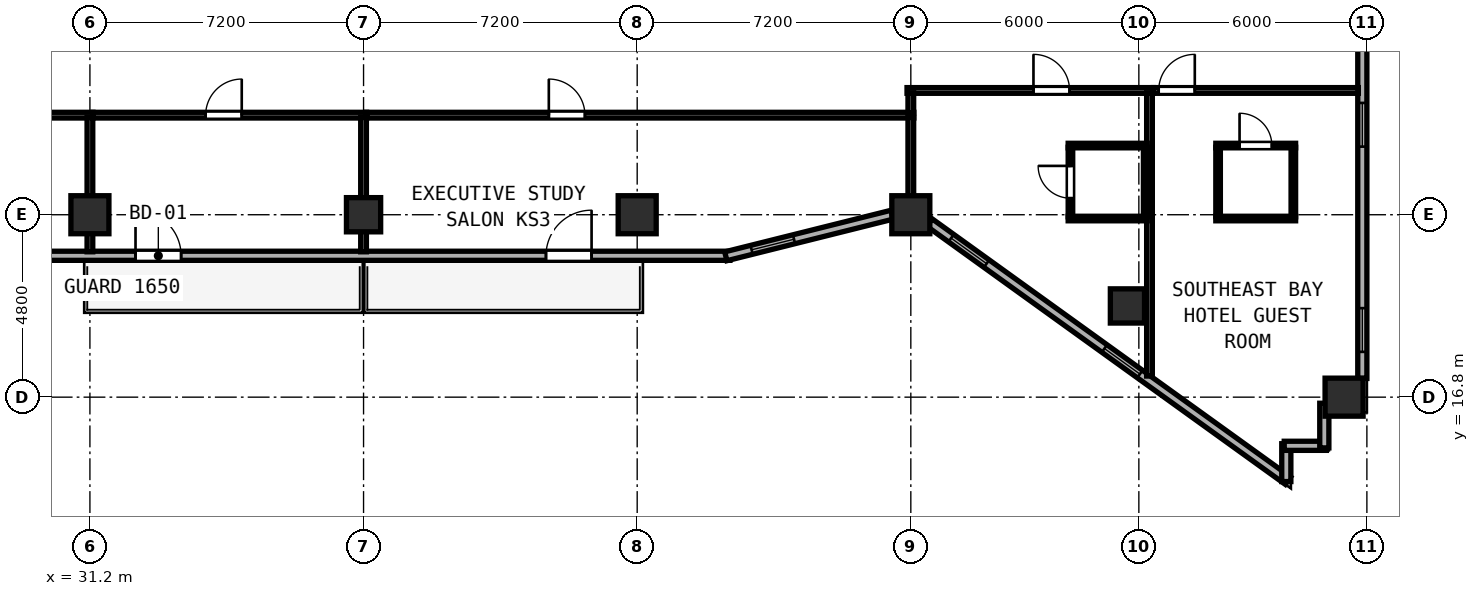
"""IFC4 building model, lengths in metres.
Left out: names, types, materials, properties, quantities, classifications, styles, units other than length and angle.
Written with IfcOpenShell. Run it as: python <this file> out.ifc"""

import sys

from ifc_helpers import new_model, si_unit, direction, frame, frame_2d, origin, origin_2d, place, context, subcontext, project, spatial, rectangle, hollow_rectangle, extrude, element, fill, save


model = new_model("IFC4")
c1 = context("Model", 3, precision=1e-05, world=origin(), true_north=direction((0.0, 1.0)))
c2 = subcontext(c1, "Body", "Model", "MODEL_VIEW")
j1 = project(units=[si_unit("LENGTHUNIT", "METRE"), si_unit("PLANEANGLEUNIT", "RADIAN")], contexts=[c1])
p1 = place(None, origin())
s1 = spatial("IfcSite", under=j1, at=p1, CompositionType="ELEMENT")
p2 = place(p1, origin())
s2 = spatial("IfcBuilding", under=s1, at=p2, CompositionType="ELEMENT")
p3 = place(p2, frame((0.0, 0.0, 144.8)))
s3 = spatial("IfcBuildingStorey", under=s2, at=p3, CompositionType="ELEMENT", Elevation=144.8)
for number, where, z_axis, x_axis in (
    (1, (52.8, 21.6, 0.0), (0.0, 0.0, 1.0), (1.0, 0.0, 0.0)),
    (2, (31.2, 21.6, 0.0), (0.0, 0.0, 1.0), (1.0, 0.0, 0.0)),
    (3, (45.6, 21.6, 0.0), (0.0, 0.0, 1.0), (1.0, 0.0, 0.0)),
    (4, (64.2, 16.8, 0.0), (0.0, 0.0, 1.0), (1.0, 0.0, 0.0)),
):
    element("IfcColumn", number, at=place(p3, frame(where, z_axis=z_axis, x_axis=x_axis)), inside=s3, PredefinedType="COLUMN", context=c2, shape_type="SweptSolid", body=[
        extrude(hollow_rectangle(XDim=1.0, YDim=1.0, WallThickness=0.038, at=origin_2d()), origin(), (0.0, 0.0, 1.0), 3.8),
    ])
for number, where, z_axis, x_axis in (
    (5, (38.4, 21.6, 0.0), (0.0, 0.0, 1.0), (1.0, 0.0, 0.0)),
    (6, (58.5, 19.2, 0.0), (0.0, 0.0, 1.0), (1.0, 0.0, 0.0)),
):
    element("IfcColumn", number, at=place(p3, frame(where, z_axis=z_axis, x_axis=x_axis)), inside=s3, PredefinedType="COLUMN", context=c2, shape_type="SweptSolid", body=[
        extrude(hollow_rectangle(XDim=0.9, YDim=0.9, WallThickness=0.034, at=origin_2d()), origin(), (0.0, 0.0, 1.0), 3.8),
    ])
p4 = place(p3, frame((28.76, 20.52, 0.0), z_axis=(0.0, 0.0, 1.0), x_axis=(1.0, 0.0, 0.0)))
e7 = element("IfcWall", 7, at=p4, inside=s3, PredefinedType="SOLIDWALL", context=c2, shape_type="SweptSolid", body=[
    extrude(rectangle(XDim=19.281, YDim=0.24, at=frame_2d((9.64, 0.0))), origin(), (0.0, 0.0, 1.0), 3.6),
])
p5 = place(p4, frame((4.84, 0.0, 0.0), z_axis=(0.0, 0.0, 1.0), x_axis=(-1.0, 0.0, 0.0)))
e8 = element("IfcOpeningElement", 8, at=p5, cuts=e7, PredefinedType="OPENING", context=c2, shape_type="SweptSolid", body=[
    extrude(rectangle(XDim=1.2, YDim=2.15, at=frame_2d((0.6, 1.075))), frame((0.0, 0.13, 0.0), z_axis=(0.0, -1.0, 0.0), x_axis=(1.0, 0.0, 0.0)), (0.0, 0.0, 1.0), 0.26),
])
p6 = place(p4, frame((15.64, 0.0, 0.0), z_axis=(0.0, 0.0, 1.0), x_axis=(-1.0, 0.0, 0.0)))
e9 = element("IfcOpeningElement", 9, at=p6, cuts=e7, PredefinedType="OPENING", context=c2, shape_type="SweptSolid", body=[
    extrude(rectangle(XDim=1.2, YDim=2.15, at=frame_2d((0.6, 1.075))), frame((0.0, 0.13, 0.0), z_axis=(0.0, -1.0, 0.0), x_axis=(1.0, 0.0, 0.0)), (0.0, 0.0, 1.0), 0.26),
])
p7 = place(p3, frame((47.932, 20.507, 0.0), z_axis=(0.0, 0.0, 1.0), x_axis=(0.970145683738, 0.242522890311, 0.0)))
e10 = element("IfcWall", 10, at=p7, inside=s3, PredefinedType="SOLIDWALL", context=c2, shape_type="SweptSolid", body=[
    extrude(rectangle(XDim=4.511, YDim=0.24, at=frame_2d((2.255, 0.0))), origin(), (0.0, 0.0, 1.0), 3.145),
])
p8 = place(p7, frame((0.7, 0.0, 0.85)))
e11 = element("IfcOpeningElement", 11, at=p8, cuts=e10, PredefinedType="OPENING", context=c2, shape_type="SweptSolid", body=[
    extrude(rectangle(XDim=1.15, YDim=1.8, at=frame_2d((0.575, 0.9))), frame((0.0, 0.13, 0.0), z_axis=(0.0, -1.0, 0.0), x_axis=(1.0, 0.0, 0.0)), (0.0, 0.0, 1.0), 0.26),
])
p9 = place(p3, frame((53.292, 21.394, 0.0), z_axis=(0.0, 0.0, 1.0), x_axis=(0.811543504691, -0.584291998913, 0.0)))
e12 = element("IfcWall", 12, at=p9, inside=s3, PredefinedType="SOLIDWALL", context=c2, shape_type="SweptSolid", body=[
    extrude(rectangle(XDim=11.623, YDim=0.24, at=frame_2d((5.812, 0.0))), origin(), (0.0, 0.0, 1.0), 3.145),
])
p10 = place(p9, frame((0.7, 0.0, 0.85)))
e13 = element("IfcOpeningElement", 13, at=p10, cuts=e12, PredefinedType="OPENING", context=c2, shape_type="SweptSolid", body=[
    extrude(rectangle(XDim=1.15, YDim=1.8, at=frame_2d((0.575, 0.9))), frame((0.0, 0.13, 0.0), z_axis=(0.0, -1.0, 0.0), x_axis=(1.0, 0.0, 0.0)), (0.0, 0.0, 1.0), 0.26),
])
p11 = place(p9, frame((5.671, 0.0, 0.85)))
e14 = element("IfcOpeningElement", 14, at=p11, cuts=e12, PredefinedType="OPENING", context=c2, shape_type="SweptSolid", body=[
    extrude(rectangle(XDim=1.15, YDim=1.8, at=frame_2d((0.575, 0.9))), frame((0.0, 0.13, 0.0), z_axis=(0.0, -1.0, 0.0), x_axis=(1.0, 0.0, 0.0)), (0.0, 0.0, 1.0), 0.26),
])
p12 = place(p3, frame((62.68, 14.579, 0.0), z_axis=(0.0, 0.0, 1.0), x_axis=(0.0, 1.0, 0.0)))
e15 = element("IfcWall", 15, at=p12, inside=s3, PredefinedType="SOLIDWALL", context=c2, shape_type="SweptSolid", body=[
    extrude(rectangle(XDim=0.996, YDim=0.24, at=frame_2d((0.498, 0.0))), origin(), (0.0, 0.0, 1.0), 3.6),
])
p13 = place(p3, frame((62.625, 15.52, 0.0), z_axis=(0.0, 0.0, 1.0), x_axis=(1.0, 0.0, 0.0)))
e16 = element("IfcWall", 16, at=p13, inside=s3, PredefinedType="SOLIDWALL", context=c2, shape_type="SweptSolid", body=[
    extrude(rectangle(XDim=1.11, YDim=0.24, at=frame_2d((0.555, 0.0))), origin(), (0.0, 0.0, 1.0), 3.6),
])
p14 = place(p3, frame((63.68, 15.465, 0.0), z_axis=(0.0, 0.0, 1.0), x_axis=(0.0, 1.0, 0.0)))
e17 = element("IfcWall", 17, at=p14, inside=s3, PredefinedType="SOLIDWALL", context=c2, shape_type="SweptSolid", body=[
    extrude(rectangle(XDim=1.175, YDim=0.24, at=frame_2d((0.587, 0.0))), origin(), (0.0, 0.0, 1.0), 3.6),
])
p15 = place(p3, frame((64.68, 17.292, 0.0), z_axis=(0.0, 0.0, 1.0), x_axis=(0.0, 1.0, 0.0)))
e18 = element("IfcWall", 18, at=p15, inside=s3, PredefinedType="SOLIDWALL", context=c2, shape_type="SweptSolid", body=[
    extrude(rectangle(XDim=9.816, YDim=0.24, at=frame_2d((4.908, 0.0))), origin(), (0.0, 0.0, 1.0), 3.6),
])
p16 = place(p15, frame((0.7, 0.0, 0.85)))
e19 = element("IfcOpeningElement", 19, at=p16, cuts=e18, PredefinedType="OPENING", context=c2, shape_type="SweptSolid", body=[
    extrude(rectangle(XDim=1.15, YDim=1.8, at=frame_2d((0.575, 0.9))), frame((0.0, 0.13, 0.0), z_axis=(0.0, -1.0, 0.0), x_axis=(1.0, 0.0, 0.0)), (0.0, 0.0, 1.0), 0.26),
])
p17 = place(p15, frame((6.1, 0.0, 0.85)))
e20 = element("IfcOpeningElement", 20, at=p17, cuts=e18, PredefinedType="OPENING", context=c2, shape_type="SweptSolid", body=[
    extrude(rectangle(XDim=1.15, YDim=1.8, at=frame_2d((0.575, 0.9))), frame((0.0, 0.13, 0.0), z_axis=(0.0, -1.0, 0.0), x_axis=(1.0, 0.0, 0.0)), (0.0, 0.0, 1.0), 0.26),
])
p18 = place(p3, frame((23.92, 24.22, 0.0), z_axis=(0.0, 0.0, 1.0), x_axis=(1.0, 0.0, 0.0)))
e21 = element("IfcWall", 21, at=p18, inside=s3, PredefinedType="PARTITIONING", context=c2, shape_type="SweptSolid", body=[
    extrude(rectangle(XDim=7.36, YDim=0.15, at=frame_2d((3.68, 0.0))), origin(), (0.0, 0.0, 1.0), 3.6),
])
p19 = place(p18, frame((5.845, 0.0, 0.0), z_axis=(0.0, 0.0, 1.0), x_axis=(-1.0, 0.0, 0.0)))
e22 = element("IfcOpeningElement", 22, at=p19, cuts=e21, PredefinedType="OPENING", context=c2, shape_type="SweptSolid", body=[
    extrude(rectangle(XDim=0.95, YDim=2.12, at=frame_2d((0.475, 1.06))), frame((0.0, 0.085, 0.0), z_axis=(0.0, -1.0, 0.0), x_axis=(1.0, 0.0, 0.0)), (0.0, 0.0, 1.0), 0.17),
])
p20 = place(p3, frame((31.2, 20.625, 0.0), z_axis=(0.0, 0.0, 1.0), x_axis=(0.0, 1.0, 0.0)))
e23 = element("IfcWall", 23, at=p20, inside=s3, PredefinedType="PARTITIONING", context=c2, shape_type="SweptSolid", body=[
    extrude(rectangle(XDim=3.535, YDim=0.15, at=frame_2d((1.768, 0.0))), origin(), (0.0, 0.0, 1.0), 3.085),
])
p21 = place(p3, frame((31.282, 24.22, 0.0), z_axis=(0.0, 0.0, 1.0), x_axis=(1.0, 0.0, 0.0)))
e24 = element("IfcWall", 24, at=p21, inside=s3, PredefinedType="PARTITIONING", context=c2, shape_type="SweptSolid", body=[
    extrude(rectangle(XDim=7.198, YDim=0.15, at=frame_2d((3.599, 0.0))), origin(), (0.0, 0.0, 1.0), 3.6),
])
p22 = place(p21, frame((3.913, 0.0, 0.0), z_axis=(0.0, 0.0, 1.0), x_axis=(-1.0, 0.0, 0.0)))
e25 = element("IfcOpeningElement", 25, at=p22, cuts=e24, PredefinedType="OPENING", context=c2, shape_type="SweptSolid", body=[
    extrude(rectangle(XDim=0.95, YDim=2.12, at=frame_2d((0.475, 1.06))), frame((0.0, 0.085, 0.0), z_axis=(0.0, -1.0, 0.0), x_axis=(1.0, 0.0, 0.0)), (0.0, 0.0, 1.0), 0.17),
])
p23 = place(p3, frame((38.4, 20.625, 0.0), z_axis=(0.0, 0.0, 1.0), x_axis=(0.0, 1.0, 0.0)))
e26 = element("IfcWall", 26, at=p23, inside=s3, PredefinedType="PARTITIONING", context=c2, shape_type="SweptSolid", body=[
    extrude(rectangle(XDim=3.535, YDim=0.15, at=frame_2d((1.768, 0.0))), origin(), (0.0, 0.0, 1.0), 3.085),
])
p24 = place(p3, frame((38.482, 24.22, 0.0), z_axis=(0.0, 0.0, 1.0), x_axis=(1.0, 0.0, 0.0)))
e27 = element("IfcWall", 27, at=p24, inside=s3, PredefinedType="PARTITIONING", context=c2, shape_type="SweptSolid", body=[
    extrude(rectangle(XDim=14.398, YDim=0.15, at=frame_2d((7.199, 0.0))), origin(), (0.0, 0.0, 1.0), 3.6),
])
p25 = place(p24, frame((5.743, 0.0, 0.0), z_axis=(0.0, 0.0, 1.0), x_axis=(-1.0, 0.0, 0.0)))
e28 = element("IfcOpeningElement", 28, at=p25, cuts=e27, PredefinedType="OPENING", context=c2, shape_type="SweptSolid", body=[
    extrude(rectangle(XDim=0.95, YDim=2.12, at=frame_2d((0.475, 1.06))), frame((0.0, 0.085, 0.0), z_axis=(0.0, -1.0, 0.0), x_axis=(1.0, 0.0, 0.0)), (0.0, 0.0, 1.0), 0.17),
])
p26 = place(p3, frame((52.8, 21.819, 0.0), z_axis=(0.0, 0.0, 1.0), x_axis=(0.0, 1.0, 0.0)))
e29 = element("IfcWall", 29, at=p26, inside=s3, PredefinedType="PARTITIONING", context=c2, shape_type="SweptSolid", body=[
    extrude(rectangle(XDim=2.341, YDim=0.15, at=frame_2d((1.171, 0.0))), origin(), (0.0, 0.0, 1.0), 3.145),
])
p27 = place(p3, frame((52.7, 24.87, 0.0), z_axis=(0.0, 0.0, 1.0), x_axis=(1.0, 0.0, 0.0)))
e30 = element("IfcWall", 30, at=p27, inside=s3, PredefinedType="PARTITIONING", context=c2, shape_type="SweptSolid", body=[
    extrude(rectangle(XDim=6.48, YDim=0.15, at=frame_2d((3.24, 0.0))), origin(), (0.0, 0.0, 1.0), 3.235),
])
p28 = place(p27, frame((4.277, 0.0, 0.0), z_axis=(0.0, 0.0, 1.0), x_axis=(-1.0, 0.0, 0.0)))
e31 = element("IfcOpeningElement", 31, at=p28, cuts=e30, PredefinedType="OPENING", context=c2, shape_type="SweptSolid", body=[
    extrude(rectangle(XDim=0.95, YDim=2.15, at=frame_2d((0.475, 1.075))), frame((0.0, 0.085, 0.0), z_axis=(0.0, -1.0, 0.0), x_axis=(1.0, 0.0, 0.0)), (0.0, 0.0, 1.0), 0.17),
])
p29 = place(p3, frame((52.8, 24.28, 0.0), z_axis=(0.0, 0.0, 1.0), x_axis=(0.0, 1.0, 0.0)))
e32 = element("IfcWall", 32, at=p29, inside=s3, PredefinedType="PARTITIONING", context=c2, shape_type="SweptSolid", body=[
    extrude(rectangle(XDim=0.53, YDim=0.15, at=frame_2d((0.265, 0.0))), origin(), (0.0, 0.0, 1.0), 3.145),
])
p30 = place(p3, frame((59.08, 17.356, 0.0), z_axis=(0.0, 0.0, 1.0), x_axis=(0.0, 1.0, 0.0)))
e33 = element("IfcWall", 33, at=p30, inside=s3, PredefinedType="PARTITIONING", context=c2, shape_type="SweptSolid", body=[
    extrude(rectangle(XDim=7.454, YDim=0.15, at=frame_2d((3.727, 0.0))), origin(), (0.0, 0.0, 1.0), 3.6),
])
for number, where, z_axis, x_axis in (
    (34, (56.94, 23.42, 0.0), (0.0, 0.0, 1.0), (1.0, 0.0, 0.0)),
    (35, (56.94, 21.5, 0.0), (0.0, 0.0, 1.0), (1.0, 0.0, 0.0)),
):
    element("IfcWall", number, at=place(p3, frame(where, z_axis=z_axis, x_axis=x_axis)), inside=s3, PredefinedType="PARTITIONING", context=c2, shape_type="SweptSolid", body=[
        extrude(rectangle(XDim=2.08, YDim=0.12, at=frame_2d((1.04, 0.0))), origin(), (0.0, 0.0, 1.0), 3.6),
    ])
p31 = place(p3, frame((57.0, 21.545, 0.0), z_axis=(0.0, 0.0, 1.0), x_axis=(0.0, 1.0, 0.0)))
e36 = element("IfcWall", 36, at=p31, inside=s3, PredefinedType="PARTITIONING", context=c2, shape_type="SweptSolid", body=[
    extrude(rectangle(XDim=1.83, YDim=0.12, at=frame_2d((0.915, 0.0))), origin(), (0.0, 0.0, 1.0), 3.6),
])
p32 = place(p31, frame((1.34, 0.0, 0.0), z_axis=(0.0, 0.0, 1.0), x_axis=(-1.0, 0.0, 0.0)))
e37 = element("IfcOpeningElement", 37, at=p32, cuts=e36, PredefinedType="OPENING", context=c2, shape_type="SweptSolid", body=[
    extrude(rectangle(XDim=0.85, YDim=2.1, at=frame_2d((0.425, 1.05))), frame((0.0, 0.07, 0.0), z_axis=(0.0, -1.0, 0.0), x_axis=(1.0, 0.0, 0.0)), (0.0, 0.0, 1.0), 0.14),
])
p33 = place(p3, frame((58.98, 21.545, 0.0), z_axis=(0.0, 0.0, 1.0), x_axis=(0.0, 1.0, 0.0)))
e38 = element("IfcWall", 38, at=p33, inside=s3, PredefinedType="PARTITIONING", context=c2, shape_type="SweptSolid", body=[
    extrude(rectangle(XDim=1.83, YDim=0.12, at=frame_2d((0.915, 0.0))), origin(), (0.0, 0.0, 1.0), 3.6),
])
p34 = place(p3, frame((59.182, 24.87, 0.0), z_axis=(0.0, 0.0, 1.0), x_axis=(1.0, 0.0, 0.0)))
e39 = element("IfcWall", 39, at=p34, inside=s3, PredefinedType="PARTITIONING", context=c2, shape_type="SweptSolid", body=[
    extrude(rectangle(XDim=5.393, YDim=0.15, at=frame_2d((2.697, 0.0))), origin(), (0.0, 0.0, 1.0), 3.235),
])
p35 = place(p34, frame((1.09, 0.0, 0.0), z_axis=(0.0, 0.0, 1.0), x_axis=(-1.0, 0.0, 0.0)))
e40 = element("IfcOpeningElement", 40, at=p35, cuts=e39, PredefinedType="OPENING", context=c2, shape_type="SweptSolid", body=[
    extrude(rectangle(XDim=0.95, YDim=2.15, at=frame_2d((0.475, 1.075))), frame((0.0, 0.085, 0.0), z_axis=(0.0, -1.0, 0.0), x_axis=(1.0, 0.0, 0.0)), (0.0, 0.0, 1.0), 0.17),
])
p36 = place(p3, frame((60.825, 23.42, 0.0), z_axis=(0.0, 0.0, 1.0), x_axis=(1.0, 0.0, 0.0)))
e41 = element("IfcWall", 41, at=p36, inside=s3, PredefinedType="PARTITIONING", context=c2, shape_type="SweptSolid", body=[
    extrude(rectangle(XDim=2.1, YDim=0.12, at=frame_2d((1.05, 0.0))), origin(), (0.0, 0.0, 1.0), 3.6),
])
p37 = place(p36, frame((1.475, 0.0, 0.0), z_axis=(0.0, 0.0, 1.0), x_axis=(-1.0, 0.0, 0.0)))
e42 = element("IfcOpeningElement", 42, at=p37, cuts=e41, PredefinedType="OPENING", context=c2, shape_type="SweptSolid", body=[
    extrude(rectangle(XDim=0.85, YDim=2.1, at=frame_2d((0.425, 1.05))), frame((0.0, 0.07, 0.0), z_axis=(0.0, -1.0, 0.0), x_axis=(1.0, 0.0, 0.0)), (0.0, 0.0, 1.0), 0.14),
])
p38 = place(p3, frame((60.825, 21.5, 0.0), z_axis=(0.0, 0.0, 1.0), x_axis=(1.0, 0.0, 0.0)))
e43 = element("IfcWall", 43, at=p38, inside=s3, PredefinedType="PARTITIONING", context=c2, shape_type="SweptSolid", body=[
    extrude(rectangle(XDim=2.1, YDim=0.12, at=frame_2d((1.05, 0.0))), origin(), (0.0, 0.0, 1.0), 3.6),
])
for number, where, z_axis, x_axis in (
    (44, (60.885, 21.545, 0.0), (0.0, 0.0, 1.0), (0.0, 1.0, 0.0)),
    (45, (62.865, 21.545, 0.0), (0.0, 0.0, 1.0), (0.0, 1.0, 0.0)),
):
    element("IfcWall", number, at=place(p3, frame(where, z_axis=z_axis, x_axis=x_axis)), inside=s3, PredefinedType="PARTITIONING", context=c2, shape_type="SweptSolid", body=[
        extrude(rectangle(XDim=1.83, YDim=0.12, at=frame_2d((0.915, 0.0))), origin(), (0.0, 0.0, 1.0), 3.6),
    ])
p39 = place(p8, origin())
e46 = element("IfcWindow", 46, at=p39, inside=s3, PartitioningType="SINGLE_PANEL", PredefinedType="WINDOW", context=c2, shape_type="SweptSolid", body=[
    extrude(rectangle(XDim=1.15, YDim=1.8, at=frame_2d((0.575, 0.9))), frame((0.0, 0.03, 0.0), z_axis=(0.0, -1.0, 0.0), x_axis=(1.0, 0.0, 0.0)), (0.0, 0.0, 1.0), 0.06),
])
fill(e11, e46)
p40 = place(p10, origin())
e47 = element("IfcWindow", 47, at=p40, inside=s3, PartitioningType="SINGLE_PANEL", PredefinedType="WINDOW", context=c2, shape_type="SweptSolid", body=[
    extrude(rectangle(XDim=1.15, YDim=1.8, at=frame_2d((0.575, 0.9))), frame((0.0, 0.03, 0.0), z_axis=(0.0, -1.0, 0.0), x_axis=(1.0, 0.0, 0.0)), (0.0, 0.0, 1.0), 0.06),
])
fill(e13, e47)
p41 = place(p11, origin())
e48 = element("IfcWindow", 48, at=p41, inside=s3, PartitioningType="SINGLE_PANEL", PredefinedType="WINDOW", context=c2, shape_type="SweptSolid", body=[
    extrude(rectangle(XDim=1.15, YDim=1.8, at=frame_2d((0.575, 0.9))), frame((0.0, 0.03, 0.0), z_axis=(0.0, -1.0, 0.0), x_axis=(1.0, 0.0, 0.0)), (0.0, 0.0, 1.0), 0.06),
])
fill(e14, e48)
p42 = place(p16, origin())
e49 = element("IfcWindow", 49, at=p42, inside=s3, PartitioningType="SINGLE_PANEL", PredefinedType="WINDOW", context=c2, shape_type="SweptSolid", body=[
    extrude(rectangle(XDim=1.15, YDim=1.8, at=frame_2d((0.575, 0.9))), frame((0.0, 0.03, 0.0), z_axis=(0.0, -1.0, 0.0), x_axis=(1.0, 0.0, 0.0)), (0.0, 0.0, 1.0), 0.06),
])
fill(e19, e49)
p43 = place(p17, origin())
e50 = element("IfcWindow", 50, at=p43, inside=s3, PartitioningType="SINGLE_PANEL", PredefinedType="WINDOW", context=c2, shape_type="SweptSolid", body=[
    extrude(rectangle(XDim=1.15, YDim=1.8, at=frame_2d((0.575, 0.9))), frame((0.0, 0.03, 0.0), z_axis=(0.0, -1.0, 0.0), x_axis=(1.0, 0.0, 0.0)), (0.0, 0.0, 1.0), 0.06),
])
fill(e20, e50)
p44 = place(p5, origin())
e51 = element("IfcDoor", 51, at=p44, inside=s3, OperationType="SINGLE_SWING_RIGHT", PredefinedType="DOOR", context=c2, shape_type="SweptSolid", body=[
    extrude(rectangle(XDim=1.2, YDim=2.15, at=frame_2d((0.6, 1.075))), frame((0.0, 0.025, 0.0), z_axis=(0.0, -1.0, 0.0), x_axis=(1.0, 0.0, 0.0)), (0.0, 0.0, 1.0), 0.05),
])
fill(e8, e51)
p45 = place(p6, origin())
e52 = element("IfcDoor", 52, at=p45, inside=s3, OperationType="SINGLE_SWING_LEFT", PredefinedType="DOOR", context=c2, shape_type="SweptSolid", body=[
    extrude(rectangle(XDim=1.2, YDim=2.15, at=frame_2d((0.6, 1.075))), frame((0.0, 0.025, 0.0), z_axis=(0.0, -1.0, 0.0), x_axis=(1.0, 0.0, 0.0)), (0.0, 0.0, 1.0), 0.05),
])
fill(e9, e52)
p46 = place(p22, origin())
e53 = element("IfcDoor", 53, at=p46, inside=s3, OperationType="SINGLE_SWING_LEFT", PredefinedType="DOOR", context=c2, shape_type="SweptSolid", body=[
    extrude(rectangle(XDim=0.95, YDim=2.12, at=frame_2d((0.475, 1.06))), frame((0.0, 0.025, 0.0), z_axis=(0.0, -1.0, 0.0), x_axis=(1.0, 0.0, 0.0)), (0.0, 0.0, 1.0), 0.05),
])
fill(e25, e53)
p47 = place(p25, origin())
e54 = element("IfcDoor", 54, at=p47, inside=s3, OperationType="SINGLE_SWING_RIGHT", PredefinedType="DOOR", context=c2, shape_type="SweptSolid", body=[
    extrude(rectangle(XDim=0.95, YDim=2.12, at=frame_2d((0.475, 1.06))), frame((0.0, 0.025, 0.0), z_axis=(0.0, -1.0, 0.0), x_axis=(1.0, 0.0, 0.0)), (0.0, 0.0, 1.0), 0.05),
])
fill(e28, e54)
p48 = place(p28, origin())
e55 = element("IfcDoor", 55, at=p48, inside=s3, OperationType="SINGLE_SWING_RIGHT", PredefinedType="DOOR", context=c2, shape_type="SweptSolid", body=[
    extrude(rectangle(XDim=0.95, YDim=2.15, at=frame_2d((0.475, 1.075))), frame((0.0, 0.025, 0.0), z_axis=(0.0, -1.0, 0.0), x_axis=(1.0, 0.0, 0.0)), (0.0, 0.0, 1.0), 0.05),
])
fill(e31, e55)
p49 = place(p32, origin())
e56 = element("IfcDoor", 56, at=p49, inside=s3, OperationType="SINGLE_SWING_LEFT", PredefinedType="DOOR", context=c2, shape_type="SweptSolid", body=[
    extrude(rectangle(XDim=0.85, YDim=2.1, at=frame_2d((0.425, 1.05))), frame((0.0, 0.025, 0.0), z_axis=(0.0, -1.0, 0.0), x_axis=(1.0, 0.0, 0.0)), (0.0, 0.0, 1.0), 0.05),
])
fill(e37, e56)
p50 = place(p35, origin())
e57 = element("IfcDoor", 57, at=p50, inside=s3, OperationType="SINGLE_SWING_LEFT", PredefinedType="DOOR", context=c2, shape_type="SweptSolid", body=[
    extrude(rectangle(XDim=0.95, YDim=2.15, at=frame_2d((0.475, 1.075))), frame((0.0, 0.025, 0.0), z_axis=(0.0, -1.0, 0.0), x_axis=(1.0, 0.0, 0.0)), (0.0, 0.0, 1.0), 0.05),
])
fill(e40, e57)
p51 = place(p37, origin())
e58 = element("IfcDoor", 58, at=p51, inside=s3, OperationType="SINGLE_SWING_RIGHT", PredefinedType="DOOR", context=c2, shape_type="SweptSolid", body=[
    extrude(rectangle(XDim=0.85, YDim=2.1, at=frame_2d((0.425, 1.05))), frame((0.0, 0.025, 0.0), z_axis=(0.0, -1.0, 0.0), x_axis=(1.0, 0.0, 0.0)), (0.0, 0.0, 1.0), 0.05),
])
fill(e42, e58)
save(model, sys.argv[1])
